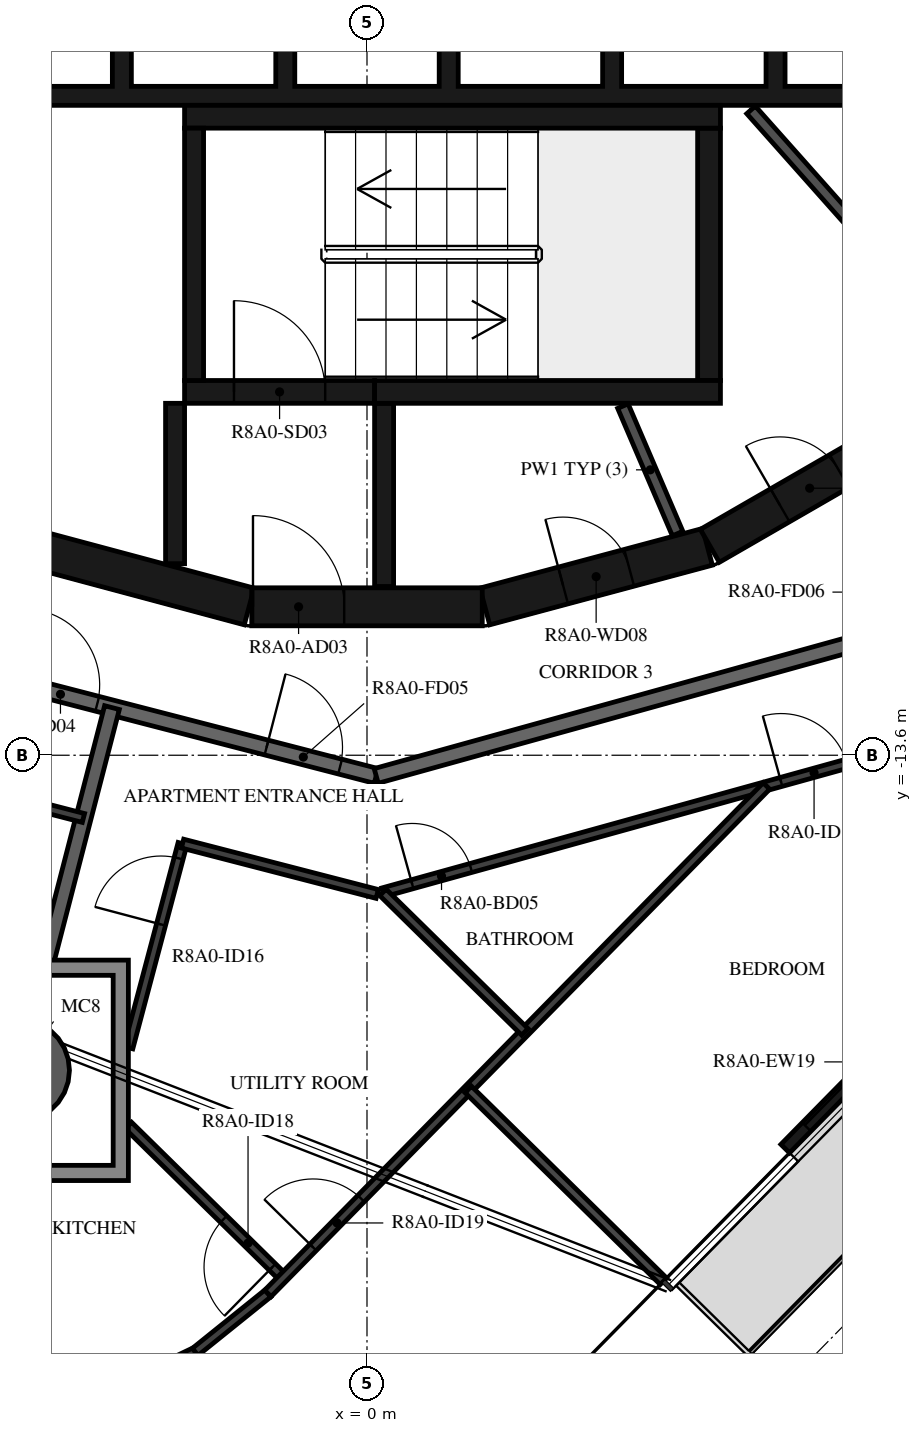
"""IFC4 building model, lengths in metres.
Left out: names, types, materials, properties, quantities, classifications, styles, units other than length and angle.
Written with IfcOpenShell. Run it as: python <this file> out.ifc"""

import sys

from ifc_helpers import new_model, si_unit, direction, frame, frame_2d, origin, origin_2d, place, context, subcontext, project, spatial, polyline, rectangle, hollow_circle, outline, extrude, element, fill, save


model = new_model("IFC4")
c1 = context("Model", 3, precision=1e-05, world=origin(), true_north=direction((0.0, 1.0)))
c2 = subcontext(c1, "Body", "Model", "MODEL_VIEW")
j1 = project(units=[si_unit("LENGTHUNIT", "METRE"), si_unit("PLANEANGLEUNIT", "RADIAN")], contexts=[c1])
p1 = place(None, origin())
s1 = spatial("IfcSite", under=j1, at=p1, CompositionType="ELEMENT")
p2 = place(p1, origin())
s2 = spatial("IfcBuilding", under=s1, at=p2, CompositionType="ELEMENT")
p3 = place(p2, frame((0.0, 0.0, 305.2)))
s3 = spatial("IfcBuildingStorey", under=s2, at=p3, CompositionType="ELEMENT", Elevation=305.2)
p4 = place(p3, frame((-4.589, -17.745, -0.38), z_axis=(0.0, 0.0, 1.0), x_axis=(1.0, 0.0, 0.0)))
e1 = element("IfcColumn", 1, at=p4, inside=s3, PredefinedType="COLUMN", context=c2, shape_type="SweptSolid", body=[
    extrude(hollow_circle(Radius=0.675, WallThickness=0.03, at=origin_2d()), origin(), (0.0, 0.0, 1.0), 3.5),
])
p5 = place(p3, frame((5.502, -18.776, 0.0), z_axis=(0.0, 0.0, 1.0), x_axis=(0.700900076932, 0.713259477439, 0.0)))
e2 = element("IfcWall", 2, at=p5, inside=s3, PredefinedType="STANDARD", context=c2, shape_type="SweptSolid", body=[
    extrude(rectangle(XDim=3.2, YDim=0.16, at=frame_2d((1.6, 0.0))), origin(), (0.0, 0.0, 1.0), 3.12),
])
p6 = place(p5, frame((0.4, 0.0, 0.0)))
e3 = element("IfcOpeningElement", 3, at=p6, cuts=e2, PredefinedType="OPENING", context=c2, shape_type="SweptSolid", body=[
    extrude(rectangle(XDim=2.4, YDim=2.4, at=frame_2d((1.2, 1.2))), frame((0.0, 0.09, 0.0), z_axis=(0.0, -1.0, 0.0), x_axis=(1.0, 0.0, 0.0)), (0.0, 0.0, 1.0), 0.18),
])
p7 = place(p3, frame((1.55, -11.643, 0.0), z_axis=(0.0, 0.0, 1.0), x_axis=(0.965948410781, 0.258734743916, 0.0)))
e4 = element("IfcWall", 4, at=p7, inside=s3, PredefinedType="SHEAR", context=c2, shape_type="SweptSolid", body=[
    extrude(rectangle(XDim=3.033, YDim=0.5, at=frame_2d((1.516, 0.0))), origin(), (0.0, 0.0, 1.0), 3.12),
])
p8 = place(p7, frame((1.066, 0.0, 0.0)))
e5 = element("IfcOpeningElement", 5, at=p8, cuts=e4, PredefinedType="OPENING", context=c2, shape_type="SweptSolid", body=[
    extrude(rectangle(XDim=0.9, YDim=2.1, at=frame_2d((0.45, 1.05))), frame((0.0, 0.26, 0.0), z_axis=(0.0, -1.0, 0.0), x_axis=(1.0, 0.0, 0.0)), (0.0, 0.0, 1.0), 0.52),
])
p9 = place(p3, frame((4.51, -10.845, 0.0), z_axis=(0.0, 0.0, 1.0), x_axis=(0.865975092491, 0.500087131594, 0.0)))
e6 = element("IfcWall", 6, at=p9, inside=s3, PredefinedType="SHEAR", context=c2, shape_type="SweptSolid", body=[
    extrude(rectangle(XDim=3.033, YDim=0.5, at=frame_2d((1.516, 0.0))), origin(), (0.0, 0.0, 1.0), 3.12),
])
p10 = place(p9, frame((1.066, 0.0, 0.0)))
e7 = element("IfcOpeningElement", 7, at=p10, cuts=e6, PredefinedType="OPENING", context=c2, shape_type="SweptSolid", body=[
    extrude(rectangle(XDim=0.9, YDim=2.1, at=frame_2d((0.45, 1.05))), frame((0.0, 0.26, 0.0), z_axis=(0.0, -1.0, 0.0), x_axis=(1.0, 0.0, 0.0)), (0.0, 0.0, 1.0), 0.52),
])
p11 = place(p3, frame((-4.479, -10.858, 0.0), z_axis=(0.0, 0.0, 1.0), x_axis=(0.965948410781, -0.258734743916, 0.0)))
e8 = element("IfcWall", 8, at=p11, inside=s3, PredefinedType="SHEAR", context=c2, shape_type="SweptSolid", body=[
    extrude(rectangle(XDim=3.033, YDim=0.5, at=frame_2d((1.516, 0.0))), origin(), (0.0, 0.0, 1.0), 3.12),
])
p12 = place(p3, frame((-1.516, -11.647, 0.0), z_axis=(0.0, 0.0, 1.0), x_axis=(1.0, 0.0, 0.0)))
e9 = element("IfcWall", 9, at=p12, inside=s3, PredefinedType="SHEAR", context=c2, shape_type="SweptSolid", body=[
    extrude(rectangle(XDim=3.033, YDim=0.5, at=frame_2d((1.516, 0.0))), origin(), (0.0, 0.0, 1.0), 3.12),
])
p13 = place(p12, frame((0.016, 0.0, 0.0)))
e10 = element("IfcOpeningElement", 10, at=p13, cuts=e9, PredefinedType="OPENING", context=c2, shape_type="SweptSolid", body=[
    extrude(rectangle(XDim=1.2, YDim=2.1, at=frame_2d((0.6, 1.05))), frame((0.0, 0.26, 0.0), z_axis=(0.0, -1.0, 0.0), x_axis=(1.0, 0.0, 0.0)), (0.0, 0.0, 1.0), 0.52),
])
p14 = place(p3, frame((-2.275, -8.67, 0.0), z_axis=(0.0, 0.0, 1.0), x_axis=(0.0, 1.0, 0.0)))
e11 = element("IfcWall", 11, at=p14, inside=s3, PredefinedType="SHEAR", context=c2, shape_type="SweptSolid", body=[
    extrude(rectangle(XDim=3.32, YDim=0.25, at=frame_2d((1.66, 0.0))), origin(), (0.0, 0.0, 1.0), 3.12),
])
p15 = place(p3, frame((-2.4, -5.2, 0.0), z_axis=(0.0, 0.0, 1.0), x_axis=(1.0, 0.0, 0.0)))
e12 = element("IfcWall", 12, at=p15, inside=s3, PredefinedType="SHEAR", context=c2, shape_type="SweptSolid", body=[
    extrude(rectangle(XDim=7.05, YDim=0.3, at=frame_2d((3.525, 0.0))), origin(), (0.0, 0.0, 1.0), 3.12),
])
p16 = place(p3, frame((4.5, -8.67, 0.0), z_axis=(0.0, 0.0, 1.0), x_axis=(0.0, 1.0, 0.0)))
e13 = element("IfcWall", 13, at=p16, inside=s3, PredefinedType="SHEAR", context=c2, shape_type="SweptSolid", body=[
    extrude(rectangle(XDim=3.32, YDim=0.3, at=frame_2d((1.66, 0.0))), origin(), (0.0, 0.0, 1.0), 3.12),
])
p17 = place(p3, frame((0.1, -8.82, 0.0), z_axis=(0.0, 0.0, 1.0), x_axis=(1.0, 0.0, 0.0)))
e14 = element("IfcWall", 14, at=p17, inside=s3, PredefinedType="SHEAR", context=c2, shape_type="SweptSolid", body=[
    extrude(rectangle(XDim=4.55, YDim=0.3, at=frame_2d((2.275, 0.0))), origin(), (0.0, 0.0, 1.0), 3.12),
])
p18 = place(p3, frame((-2.4, -8.82, 0.0), z_axis=(0.0, 0.0, 1.0), x_axis=(1.0, 0.0, 0.0)))
e15 = element("IfcWall", 15, at=p18, inside=s3, PredefinedType="SHEAR", context=c2, shape_type="SweptSolid", body=[
    extrude(rectangle(XDim=2.5, YDim=0.3, at=frame_2d((1.25, 0.0))), origin(), (0.0, 0.0, 1.0), 3.12),
])
p19 = place(p18, frame((0.65, 0.0, 0.0)))
e16 = element("IfcOpeningElement", 16, at=p19, cuts=e15, PredefinedType="OPENING", context=c2, shape_type="SweptSolid", body=[
    extrude(rectangle(XDim=1.2, YDim=2.1, at=frame_2d((0.6, 1.05))), frame((0.0, 0.16, 0.0), z_axis=(0.0, -1.0, 0.0), x_axis=(1.0, 0.0, 0.0)), (0.0, 0.0, 1.0), 0.32),
])
p20 = place(p3, frame((-2.525, -8.97, 0.0), z_axis=(0.0, 0.0, 1.0), x_axis=(0.0, -1.0, 0.0)))
e17 = element("IfcWall", 17, at=p20, inside=s3, PredefinedType="SHEAR", context=c2, shape_type="SweptSolid", body=[
    extrude(rectangle(XDim=2.11, YDim=0.25, at=frame_2d((1.055, 0.0))), origin(), (0.0, 0.0, 1.0), 3.12),
])
p21 = place(p3, frame((0.225, -8.97, 0.0), z_axis=(0.0, 0.0, 1.0), x_axis=(0.0, -1.0, 0.0)))
e18 = element("IfcWall", 18, at=p21, inside=s3, PredefinedType="SHEAR", context=c2, shape_type="SweptSolid", body=[
    extrude(rectangle(XDim=2.41, YDim=0.25, at=frame_2d((1.205, 0.0))), origin(), (0.0, 0.0, 1.0), 3.12),
])
p22 = place(p3, origin())
e19 = element("IfcWall", 19, at=p22, inside=s3, PredefinedType="SHEAR", context=c2, shape_type="SweptSolid", body=[
    extrude(outline(polyline([(9.8, -5.05), (9.8, -4.8), (9.8, -1.9), (9.55, -1.9), (9.55, -4.8), (7.65, -4.8), (7.65, -1.9), (7.4, -1.9), (7.4, -4.8), (5.5, -4.8), (5.5, -1.9), (5.25, -1.9), (5.25, -4.8), (3.35, -4.8), (3.35, -1.9), (3.1, -1.9), (3.1, -4.8), (1.2, -4.8), (1.2, -1.9), (0.95, -1.9), (0.95, -4.8), (-0.95, -4.8), (-0.95, -1.9), (-1.2, -1.9), (-1.2, -4.8), (-3.1, -4.8), (-3.1, -1.9), (-3.35, -1.9), (-3.35, -4.8), (-5.25, -4.8), (-5.25, -1.9), (-5.5, -1.9), (-5.5, -4.8), (-9.55, -4.8), (-9.55, -1.9), (-9.8, -1.9), (-9.8, -4.8), (-9.8, -5.05), (9.8, -5.05)])), origin(), (0.0, 0.0, 1.0), 3.12),
])
p23 = place(p3, frame((7.842, -8.248, 0.0), z_axis=(0.0, 0.0, 1.0), x_axis=(-0.66446128181, 0.747322691329, 0.0)))
e20 = element("IfcWall", 20, at=p23, inside=s3, PredefinedType="PARTITIONING", context=c2, shape_type="SweptSolid", body=[
    extrude(rectangle(XDim=4.198, YDim=0.15, at=frame_2d((2.099, 0.0))), origin(), (0.0, 0.0, 1.0), 3.12),
])
p24 = place(p3, frame((3.367, -9.007, 0.0), z_axis=(0.0, 0.0, 1.0), x_axis=(0.394387482265, -0.918944238696, 0.0)))
e21 = element("IfcWall", 21, at=p24, inside=s3, PredefinedType="PARTITIONING", context=c2, shape_type="SweptSolid", body=[
    extrude(rectangle(XDim=1.825, YDim=0.15, at=frame_2d((0.913, 0.0))), origin(), (0.0, 0.0, 1.0), 3.12),
])
p25 = place(p3, frame((-6.831, -12.074, 0.0), z_axis=(0.0, 0.0, 1.0), x_axis=(0.968144780225, -0.250391063186, 0.0)))
e22 = element("IfcWall", 22, at=p25, inside=s3, PredefinedType="STANDARD", context=c2, shape_type="SweptSolid", body=[
    extrude(rectangle(XDim=7.181, YDim=0.2, at=frame_2d((3.591, 0.0))), origin(), (0.0, 0.0, 1.0), 3.12),
])
p26 = place(p25, frame((2.39, 0.0, 0.0)))
e23 = element("IfcOpeningElement", 23, at=p26, cuts=e22, PredefinedType="OPENING", context=c2, shape_type="SweptSolid", body=[
    extrude(rectangle(XDim=1.0, YDim=2.1, at=frame_2d((0.5, 1.05))), frame((0.0, 0.11, 0.0), z_axis=(0.0, -1.0, 0.0), x_axis=(1.0, 0.0, 0.0)), (0.0, 0.0, 1.0), 0.22),
])
p27 = place(p25, frame((5.69, 0.0, 0.0)))
e24 = element("IfcOpeningElement", 24, at=p27, cuts=e22, PredefinedType="OPENING", context=c2, shape_type="SweptSolid", body=[
    extrude(rectangle(XDim=1.0, YDim=2.1, at=frame_2d((0.5, 1.05))), frame((0.0, 0.11, 0.0), z_axis=(0.0, -1.0, 0.0), x_axis=(1.0, 0.0, 0.0)), (0.0, 0.0, 1.0), 0.22),
])
p28 = place(p3, frame((0.121, -13.872, 0.0), z_axis=(0.0, 0.0, 1.0), x_axis=(0.963625960674, 0.267254575108, 0.0)))
e25 = element("IfcWall", 25, at=p28, inside=s3, PredefinedType="STANDARD", context=c2, shape_type="SweptSolid", body=[
    extrude(rectangle(XDim=7.181, YDim=0.2, at=frame_2d((3.591, 0.0))), origin(), (0.0, 0.0, 1.0), 3.12),
])
p29 = place(p3, frame((-4.214, -16.295, 0.0), z_axis=(0.0, 0.0, 1.0), x_axis=(0.250428810918, 0.968135016752, 0.0)))
e26 = element("IfcWall", 26, at=p29, inside=s3, PredefinedType="STANDARD", context=c2, shape_type="SweptSolid", body=[
    extrude(rectangle(XDim=3.432, YDim=0.2, at=frame_2d((1.716, 0.0))), origin(), (0.0, 0.0, 1.0), 3.12),
])
p30 = place(p3, frame((-7.596, -13.426, 0.0), z_axis=(0.0, 0.0, 1.0), x_axis=(0.96815406745, -0.250355151095, 0.0)))
e27 = element("IfcWall", 27, at=p30, inside=s3, PredefinedType="PARTITIONING", context=c2, shape_type="SweptSolid", body=[
    extrude(rectangle(XDim=3.992, YDim=0.12, at=frame_2d((1.996, 0.0))), origin(), (0.0, 0.0, 1.0), 3.12),
])
p31 = place(p30, frame((0.2, 0.0, 0.0)))
e28 = element("IfcOpeningElement", 28, at=p31, cuts=e27, PredefinedType="OPENING", context=c2, shape_type="SweptSolid", body=[
    extrude(rectangle(XDim=0.9, YDim=2.1, at=frame_2d((0.45, 1.05))), frame((0.0, 0.07, 0.0), z_axis=(0.0, -1.0, 0.0), x_axis=(1.0, 0.0, 0.0)), (0.0, 0.0, 1.0), 0.14),
])
p32 = place(p3, frame((-3.139, -17.448, 0.0), z_axis=(0.0, 0.0, 1.0), x_axis=(0.256551998295, 0.966530430028, 0.0)))
e29 = element("IfcWall", 29, at=p32, inside=s3, PredefinedType="PARTITIONING", context=c2, shape_type="SweptSolid", body=[
    extrude(rectangle(XDim=2.778, YDim=0.12, at=frame_2d((1.389, 0.0))), origin(), (0.0, 0.0, 1.0), 3.12),
])
p33 = place(p32, frame((1.678, 0.0, 0.0)))
e30 = element("IfcOpeningElement", 30, at=p33, cuts=e29, PredefinedType="OPENING", context=c2, shape_type="SweptSolid", body=[
    extrude(rectangle(XDim=0.9, YDim=2.1, at=frame_2d((0.45, 1.05))), frame((0.0, 0.07, 0.0), z_axis=(0.0, -1.0, 0.0), x_axis=(1.0, 0.0, 0.0)), (0.0, 0.0, 1.0), 0.14),
])
p34 = place(p3, frame((-2.427, -14.763, 0.0), z_axis=(0.0, 0.0, 1.0), x_axis=(0.968151154118, -0.250366417036, 0.0)))
e31 = element("IfcWall", 31, at=p34, inside=s3, PredefinedType="PARTITIONING", context=c2, shape_type="SweptSolid", body=[
    extrude(rectangle(XDim=2.646, YDim=0.12, at=frame_2d((1.323, 0.0))), origin(), (0.0, 0.0, 1.0), 3.12),
])
p35 = place(p3, frame((0.21, -15.404, 0.0), z_axis=(0.0, 0.0, 1.0), x_axis=(0.963630625717, 0.267237754032, 0.0)))
e32 = element("IfcWall", 32, at=p35, inside=s3, PredefinedType="PARTITIONING", context=c2, shape_type="SweptSolid", body=[
    extrude(rectangle(XDim=7.907, YDim=0.12, at=frame_2d((3.954, 0.0))), origin(), (0.0, 0.0, 1.0), 3.12),
])
p36 = place(p35, frame((0.4, 0.0, 0.0)))
e33 = element("IfcOpeningElement", 33, at=p36, cuts=e32, PredefinedType="OPENING", context=c2, shape_type="SweptSolid", body=[
    extrude(rectangle(XDim=0.8, YDim=2.1, at=frame_2d((0.4, 1.05))), frame((0.0, 0.07, 0.0), z_axis=(0.0, -1.0, 0.0), x_axis=(1.0, 0.0, 0.0)), (0.0, 0.0, 1.0), 0.14),
])
p37 = place(p35, frame((5.436, 0.0, 0.0)))
e34 = element("IfcOpeningElement", 34, at=p37, cuts=e32, PredefinedType="OPENING", context=c2, shape_type="SweptSolid", body=[
    extrude(rectangle(XDim=0.9, YDim=2.1, at=frame_2d((0.45, 1.05))), frame((0.0, 0.07, 0.0), z_axis=(0.0, -1.0, 0.0), x_axis=(1.0, 0.0, 0.0)), (0.0, 0.0, 1.0), 0.14),
])
p38 = place(p3, frame((-2.26, -21.449, 0.0), z_axis=(0.0, 0.0, 1.0), x_axis=(-0.90254047062, -0.430605038166, 0.0)))
e35 = element("IfcWall", 35, at=p38, inside=s3, PredefinedType="PARTITIONING", context=c2, shape_type="SweptSolid", body=[
    extrude(rectangle(XDim=1.016, YDim=0.12, at=frame_2d((0.508, 0.0))), origin(), (0.0, 0.0, 1.0), 3.12),
])
p39 = place(p3, frame((-1.101, -20.474, 0.0), z_axis=(0.0, 0.0, 1.0), x_axis=(-0.713316946232, 0.700841589961, 0.0)))
e36 = element("IfcWall", 36, at=p39, inside=s3, PredefinedType="PARTITIONING", context=c2, shape_type="SweptSolid", body=[
    extrude(rectangle(XDim=2.857, YDim=0.12, at=frame_2d((1.429, 0.0))), origin(), (0.0, 0.0, 1.0), 3.12),
])
p40 = place(p39, frame((0.2, 0.0, 0.0)))
e37 = element("IfcOpeningElement", 37, at=p40, cuts=e36, PredefinedType="OPENING", context=c2, shape_type="SweptSolid", body=[
    extrude(rectangle(XDim=0.9, YDim=2.1, at=frame_2d((0.45, 1.05))), frame((0.0, 0.07, 0.0), z_axis=(0.0, -1.0, 0.0), x_axis=(1.0, 0.0, 0.0)), (0.0, 0.0, 1.0), 0.14),
])
p41 = place(p3, frame((-2.26, -21.449, 0.0), z_axis=(0.0, 0.0, 1.0), x_axis=(0.779021167429, 0.626997624156, 0.0)))
e38 = element("IfcWall", 38, at=p41, inside=s3, PredefinedType="PARTITIONING", context=c2, shape_type="SweptSolid", body=[
    extrude(rectangle(XDim=1.227, YDim=0.12, at=frame_2d((0.614, 0.0))), origin(), (0.0, 0.0, 1.0), 3.12),
])
p42 = place(p3, frame((-1.304, -20.68, 0.0), z_axis=(0.0, 0.0, 1.0), x_axis=(0.700896976526, 0.713262524108, 0.0)))
e39 = element("IfcWall", 39, at=p42, inside=s3, PredefinedType="PARTITIONING", context=c2, shape_type="SweptSolid", body=[
    extrude(rectangle(XDim=9.358, YDim=0.12, at=frame_2d((4.679, 0.0))), origin(), (0.0, 0.0, 1.0), 3.12),
])
p43 = place(p42, frame((0.849, 0.0, 0.0)))
e40 = element("IfcOpeningElement", 40, at=p43, cuts=e39, PredefinedType="OPENING", context=c2, shape_type="SweptSolid", body=[
    extrude(rectangle(XDim=0.9, YDim=2.1, at=frame_2d((0.45, 1.05))), frame((0.0, 0.07, 0.0), z_axis=(0.0, -1.0, 0.0), x_axis=(1.0, 0.0, 0.0)), (0.0, 0.0, 1.0), 0.14),
])
p44 = place(p3, frame((2.077, -17.239, 0.0), z_axis=(0.0, 0.0, 1.0), x_axis=(-0.713235001716, 0.700924983381, 0.0)))
e41 = element("IfcWall", 41, at=p44, inside=s3, PredefinedType="PARTITIONING", context=c2, shape_type="SweptSolid", body=[
    extrude(rectangle(XDim=2.618, YDim=0.12, at=frame_2d((1.309, 0.0))), origin(), (0.0, 0.0, 1.0), 3.12),
])
p45 = place(p3, frame((3.9, -20.521, 0.0), z_axis=(0.0, 0.0, 1.0), x_axis=(-0.713217465002, 0.700942827637, 0.0)))
e42 = element("IfcWall", 42, at=p45, inside=s3, PredefinedType="PARTITIONING", context=c2, shape_type="SweptSolid", body=[
    extrude(rectangle(XDim=3.6, YDim=0.12, at=frame_2d((1.8, 0.0))), origin(), (0.0, 0.0, 1.0), 2.73),
])
p46 = place(p3, origin())
e43 = element("IfcWall", 43, at=p46, inside=s3, PredefinedType="STANDARD", context=c2, shape_type="SweptSolid", body=[
    extrude(outline(polyline([(-3.139, -16.295), (-3.139, -19.195), (-6.039, -19.195), (-6.039, -16.295), (-3.139, -16.295)]), holes=[polyline([(-5.839, -18.995), (-3.339, -18.995), (-3.339, -16.495), (-5.839, -16.495), (-5.839, -18.995)])]), origin(), (0.0, 0.0, 1.0), 3.12),
])
p47 = place(p6, origin())
e44 = element("IfcDoor", 44, at=p47, inside=s3, OperationType="DOUBLE_DOOR_SLIDING", PredefinedType="DOOR", context=c2, shape_type="SweptSolid", body=[
    extrude(rectangle(XDim=2.4, YDim=2.4, at=frame_2d((1.2, 1.2))), frame((0.0, 0.025, 0.0), z_axis=(0.0, -1.0, 0.0), x_axis=(1.0, 0.0, 0.0)), (0.0, 0.0, 1.0), 0.05),
])
fill(e3, e44)
p48 = place(p19, origin())
e45 = element("IfcDoor", 45, at=p48, inside=s3, OperationType="SINGLE_SWING_LEFT", PredefinedType="DOOR", context=c2, shape_type="SweptSolid", body=[
    extrude(rectangle(XDim=1.2, YDim=2.1, at=frame_2d((0.6, 1.05))), frame((0.0, 0.025, 0.0), z_axis=(0.0, -1.0, 0.0), x_axis=(1.0, 0.0, 0.0)), (0.0, 0.0, 1.0), 0.05),
])
fill(e16, e45)
p49 = place(p13, origin())
e46 = element("IfcDoor", 46, at=p49, inside=s3, OperationType="SINGLE_SWING_RIGHT", PredefinedType="DOOR", context=c2, shape_type="SweptSolid", body=[
    extrude(rectangle(XDim=1.2, YDim=2.1, at=frame_2d((0.6, 1.05))), frame((0.0, 0.025, 0.0), z_axis=(0.0, -1.0, 0.0), x_axis=(1.0, 0.0, 0.0)), (0.0, 0.0, 1.0), 0.05),
])
fill(e10, e46)
p50 = place(p8, origin())
e47 = element("IfcDoor", 47, at=p50, inside=s3, OperationType="SINGLE_SWING_RIGHT", PredefinedType="DOOR", context=c2, shape_type="SweptSolid", body=[
    extrude(rectangle(XDim=0.9, YDim=2.1, at=frame_2d((0.45, 1.05))), frame((0.0, 0.025, 0.0), z_axis=(0.0, -1.0, 0.0), x_axis=(1.0, 0.0, 0.0)), (0.0, 0.0, 1.0), 0.05),
])
fill(e5, e47)
p51 = place(p10, origin())
e48 = element("IfcDoor", 48, at=p51, inside=s3, OperationType="SINGLE_SWING_LEFT", PredefinedType="DOOR", context=c2, shape_type="SweptSolid", body=[
    extrude(rectangle(XDim=0.9, YDim=2.1, at=frame_2d((0.45, 1.05))), frame((0.0, 0.025, 0.0), z_axis=(0.0, -1.0, 0.0), x_axis=(1.0, 0.0, 0.0)), (0.0, 0.0, 1.0), 0.05),
])
fill(e7, e48)
p52 = place(p26, origin())
e49 = element("IfcDoor", 49, at=p52, inside=s3, OperationType="SINGLE_SWING_RIGHT", PredefinedType="DOOR", context=c2, shape_type="SweptSolid", body=[
    extrude(rectangle(XDim=1.0, YDim=2.1, at=frame_2d((0.5, 1.05))), frame((0.0, 0.025, 0.0), z_axis=(0.0, -1.0, 0.0), x_axis=(1.0, 0.0, 0.0)), (0.0, 0.0, 1.0), 0.05),
])
fill(e23, e49)
p53 = place(p27, origin())
e50 = element("IfcDoor", 50, at=p53, inside=s3, OperationType="SINGLE_SWING_LEFT", PredefinedType="DOOR", context=c2, shape_type="SweptSolid", body=[
    extrude(rectangle(XDim=1.0, YDim=2.1, at=frame_2d((0.5, 1.05))), frame((0.0, 0.025, 0.0), z_axis=(0.0, -1.0, 0.0), x_axis=(1.0, 0.0, 0.0)), (0.0, 0.0, 1.0), 0.05),
])
fill(e24, e50)
p54 = place(p33, origin())
e51 = element("IfcDoor", 51, at=p54, inside=s3, OperationType="SINGLE_SWING_LEFT", PredefinedType="DOOR", context=c2, shape_type="SweptSolid", body=[
    extrude(rectangle(XDim=0.9, YDim=2.1, at=frame_2d((0.45, 1.05))), frame((0.0, 0.025, 0.0), z_axis=(0.0, -1.0, 0.0), x_axis=(1.0, 0.0, 0.0)), (0.0, 0.0, 1.0), 0.05),
])
fill(e30, e51)
p55 = place(p36, origin())
e52 = element("IfcDoor", 52, at=p55, inside=s3, OperationType="SINGLE_SWING_LEFT", PredefinedType="DOOR", context=c2, shape_type="SweptSolid", body=[
    extrude(rectangle(XDim=0.8, YDim=2.1, at=frame_2d((0.4, 1.05))), frame((0.0, 0.025, 0.0), z_axis=(0.0, -1.0, 0.0), x_axis=(1.0, 0.0, 0.0)), (0.0, 0.0, 1.0), 0.05),
])
fill(e33, e52)
p56 = place(p37, origin())
e53 = element("IfcDoor", 53, at=p56, inside=s3, OperationType="SINGLE_SWING_LEFT", PredefinedType="DOOR", context=c2, shape_type="SweptSolid", body=[
    extrude(rectangle(XDim=0.9, YDim=2.1, at=frame_2d((0.45, 1.05))), frame((0.0, 0.025, 0.0), z_axis=(0.0, -1.0, 0.0), x_axis=(1.0, 0.0, 0.0)), (0.0, 0.0, 1.0), 0.05),
])
fill(e34, e53)
p57 = place(p40, origin())
e54 = element("IfcDoor", 54, at=p57, inside=s3, OperationType="SINGLE_SWING_LEFT", PredefinedType="DOOR", context=c2, shape_type="SweptSolid", body=[
    extrude(rectangle(XDim=0.9, YDim=2.1, at=frame_2d((0.45, 1.05))), frame((0.0, 0.025, 0.0), z_axis=(0.0, -1.0, 0.0), x_axis=(1.0, 0.0, 0.0)), (0.0, 0.0, 1.0), 0.05),
])
fill(e37, e54)
p58 = place(p43, origin())
e55 = element("IfcDoor", 55, at=p58, inside=s3, OperationType="SINGLE_SWING_LEFT", PredefinedType="DOOR", context=c2, shape_type="SweptSolid", body=[
    extrude(rectangle(XDim=0.9, YDim=2.1, at=frame_2d((0.45, 1.05))), frame((0.0, 0.025, 0.0), z_axis=(0.0, -1.0, 0.0), x_axis=(1.0, 0.0, 0.0)), (0.0, 0.0, 1.0), 0.05),
])
fill(e40, e55)
save(model, sys.argv[1])
